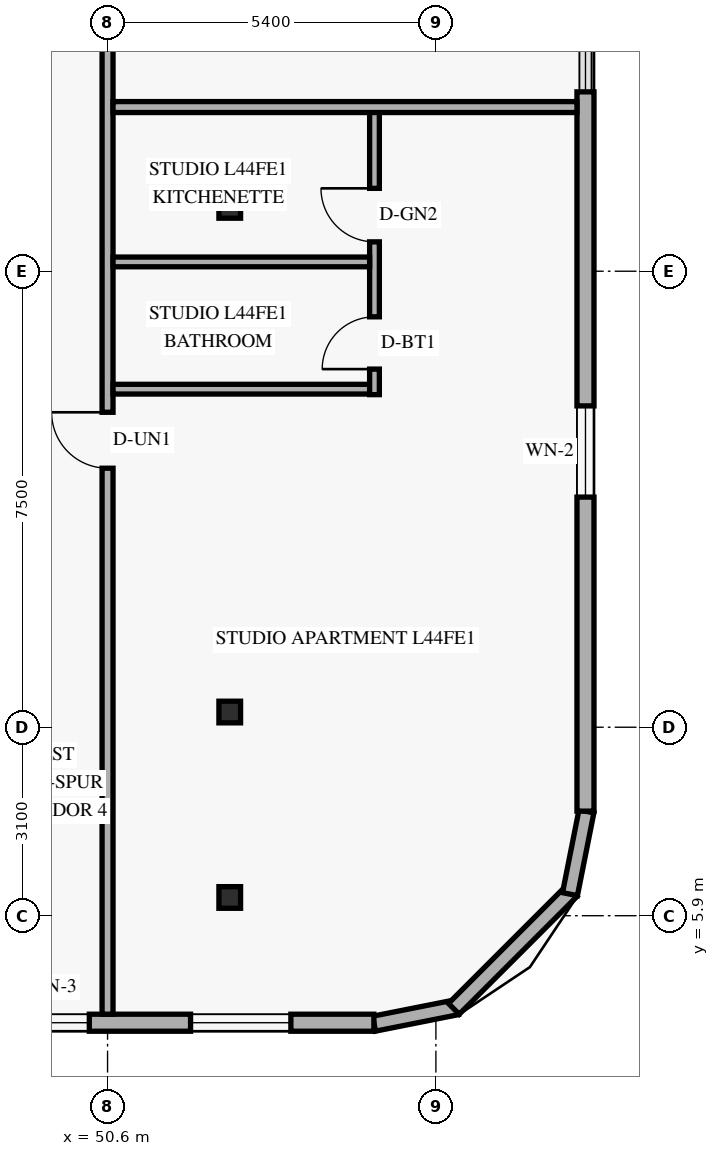
"""IFC4 building model, lengths in metres.
Left out: names, types, materials, properties, quantities, classifications, styles, units other than length and angle.
Written with IfcOpenShell. Run it as: python <this file> out.ifc"""

import sys

from ifc_helpers import new_model, si_unit, direction, frame, frame_2d, origin, origin_2d, place, context, subcontext, project, spatial, rectangle, hollow_rectangle, extrude, element, fill, save


model = new_model("IFC4")
c1 = context("Model", 3, precision=1e-05, world=origin(), true_north=direction((0.0, 1.0)))
c2 = subcontext(c1, "Body", "Model", "MODEL_VIEW")
j1 = project(units=[si_unit("LENGTHUNIT", "METRE"), si_unit("PLANEANGLEUNIT", "RADIAN")], contexts=[c1])
p1 = place(None, origin())
s1 = spatial("IfcSite", under=j1, at=p1, CompositionType="ELEMENT")
p2 = place(p1, origin())
s2 = spatial("IfcBuilding", under=s1, at=p2, CompositionType="ELEMENT")
p3 = place(p2, frame((0.0, 0.0, 169.8)))
s3 = spatial("IfcBuildingStorey", under=s2, at=p3, CompositionType="ELEMENT", Elevation=169.8)
for number, where, z_axis, x_axis in (
    (1, (52.505, 6.2, 0.0), (0.058, 0.0, 0.998), (0.0, 1.0, 0.0)),
    (2, (52.505, 9.25, 0.0), (0.058, 0.0, 0.998), (0.0, 1.0, 0.0)),
    (3, (52.505, 17.55, 0.0), (0.058, 0.0, 0.998), (0.0, 1.0, 0.0)),
):
    element("IfcColumn", number, at=place(p3, frame(where, z_axis=z_axis, x_axis=x_axis)), inside=s3, PredefinedType="COLUMN", context=c2, shape_type="SweptSolid", body=[
        extrude(hollow_rectangle(XDim=0.356, YDim=0.356, WallThickness=0.016, at=origin_2d()), origin(), (0.0, 0.0, 1.0), 3.606),
    ])
p4 = place(p3, frame((54.983, 4.124, 0.0), z_axis=(0.0, 0.0, 1.0), x_axis=(0.980809899341, 0.19496651342, 0.0)))
e4 = element("IfcWall", 4, at=p4, inside=s3, PredefinedType="SOLIDWALL", context=c2, shape_type="SweptSolid", body=[
    extrude(rectangle(XDim=1.389, YDim=0.25, at=frame_2d((0.694, 0.0))), origin(), (0.0, 0.0, 1.0), 3.35),
])
p5 = place(p3, frame((56.295, 4.368, 0.0), z_axis=(0.0, 0.0, 1.0), x_axis=(0.707106781187, 0.707106781187, 0.0)))
e5 = element("IfcWall", 5, at=p5, inside=s3, PredefinedType="SOLIDWALL", context=c2, shape_type="SweptSolid", body=[
    extrude(rectangle(XDim=2.739, YDim=0.25, at=frame_2d((1.37, 0.0))), origin(), (0.0, 0.0, 1.0), 3.35),
])
p6 = place(p3, frame((58.205, 6.254, 0.0), z_axis=(0.0, 0.0, 1.0), x_axis=(0.19496651342, 0.980809899341, 0.0)))
e6 = element("IfcWall", 6, at=p6, inside=s3, PredefinedType="SOLIDWALL", context=c2, shape_type="SweptSolid", body=[
    extrude(rectangle(XDim=1.389, YDim=0.25, at=frame_2d((0.694, 0.0))), origin(), (0.0, 0.0, 1.0), 3.35),
])
p7 = place(p3, frame((21.22, 4.14, 0.0), z_axis=(0.0, 0.0, 1.0), x_axis=(1.0, 0.0, 0.0)))
e7 = element("IfcWall", 7, at=p7, inside=s3, PredefinedType="SOLIDWALL", context=c2, shape_type="SweptSolid", body=[
    extrude(rectangle(XDim=33.76, YDim=0.28, at=frame_2d((16.88, 0.0))), origin(), (0.0, 0.0, 1.0), 3.35),
])
p8 = place(p7, frame((2.68, 0.0, 0.85)))
e8 = element("IfcOpeningElement", 8, at=p8, cuts=e7, PredefinedType="OPENING", context=c2, shape_type="SweptSolid", body=[
    extrude(rectangle(XDim=1.65, YDim=1.6, at=frame_2d((0.825, 0.8))), frame((0.0, 0.15, 0.0), z_axis=(0.0, -1.0, 0.0), x_axis=(1.0, 0.0, 0.0)), (0.0, 0.0, 1.0), 0.3),
])
p9 = place(p7, frame((9.565, 0.0, 0.85)))
e9 = element("IfcOpeningElement", 9, at=p9, cuts=e7, PredefinedType="OPENING", context=c2, shape_type="SweptSolid", body=[
    extrude(rectangle(XDim=1.65, YDim=1.6, at=frame_2d((0.825, 0.8))), frame((0.0, 0.15, 0.0), z_axis=(0.0, -1.0, 0.0), x_axis=(1.0, 0.0, 0.0)), (0.0, 0.0, 1.0), 0.3),
])
p10 = place(p7, frame((14.84, 0.0, 0.85)))
e10 = element("IfcOpeningElement", 10, at=p10, cuts=e7, PredefinedType="OPENING", context=c2, shape_type="SweptSolid", body=[
    extrude(rectangle(XDim=1.65, YDim=1.6, at=frame_2d((0.825, 0.8))), frame((0.0, 0.15, 0.0), z_axis=(0.0, -1.0, 0.0), x_axis=(1.0, 0.0, 0.0)), (0.0, 0.0, 1.0), 0.3),
])
p11 = place(p7, frame((19.035, 0.0, 0.85)))
e11 = element("IfcOpeningElement", 11, at=p11, cuts=e7, PredefinedType="OPENING", context=c2, shape_type="SweptSolid", body=[
    extrude(rectangle(XDim=1.65, YDim=1.6, at=frame_2d((0.825, 0.8))), frame((0.0, 0.15, 0.0), z_axis=(0.0, -1.0, 0.0), x_axis=(1.0, 0.0, 0.0)), (0.0, 0.0, 1.0), 0.3),
])
p12 = place(p7, frame((24.26, 0.0, 0.85)))
e12 = element("IfcOpeningElement", 12, at=p12, cuts=e7, PredefinedType="OPENING", context=c2, shape_type="SweptSolid", body=[
    extrude(rectangle(XDim=1.65, YDim=1.6, at=frame_2d((0.825, 0.8))), frame((0.0, 0.15, 0.0), z_axis=(0.0, -1.0, 0.0), x_axis=(1.0, 0.0, 0.0)), (0.0, 0.0, 1.0), 0.3),
])
p13 = place(p7, frame((27.88, 0.0, 0.85)))
e13 = element("IfcOpeningElement", 13, at=p13, cuts=e7, PredefinedType="OPENING", context=c2, shape_type="SweptSolid", body=[
    extrude(rectangle(XDim=1.2, YDim=1.5, at=frame_2d((0.6, 0.75))), frame((0.0, 0.15, 0.0), z_axis=(0.0, -1.0, 0.0), x_axis=(1.0, 0.0, 0.0)), (0.0, 0.0, 1.0), 0.3),
])
p14 = place(p7, frame((30.745, 0.0, 0.85)))
e14 = element("IfcOpeningElement", 14, at=p14, cuts=e7, PredefinedType="OPENING", context=c2, shape_type="SweptSolid", body=[
    extrude(rectangle(XDim=1.65, YDim=1.6, at=frame_2d((0.825, 0.8))), frame((0.0, 0.15, 0.0), z_axis=(0.0, -1.0, 0.0), x_axis=(1.0, 0.0, 0.0)), (0.0, 0.0, 1.0), 0.3),
])
p15 = place(p3, frame((58.46, 7.62, 0.0), z_axis=(0.0, 0.0, 1.0), x_axis=(0.0, 1.0, 0.0)))
e15 = element("IfcWall", 15, at=p15, inside=s3, PredefinedType="SOLIDWALL", context=c2, shape_type="SweptSolid", body=[
    extrude(rectangle(XDim=11.83, YDim=0.28, at=frame_2d((5.915, 0.0))), origin(), (0.0, 0.0, 1.0), 3.35),
])
p16 = place(p15, frame((5.165, 0.0, 0.85)))
e16 = element("IfcOpeningElement", 16, at=p16, cuts=e15, PredefinedType="OPENING", context=c2, shape_type="SweptSolid", body=[
    extrude(rectangle(XDim=1.5, YDim=1.55, at=frame_2d((0.75, 0.775))), frame((0.0, 0.15, 0.0), z_axis=(0.0, -1.0, 0.0), x_axis=(1.0, 0.0, 0.0)), (0.0, 0.0, 1.0), 0.3),
])
p17 = place(p3, frame((50.6, 4.28, 0.0), z_axis=(0.0, 0.0, 1.0), x_axis=(0.0, 1.0, 0.0)))
e17 = element("IfcWall", 17, at=p17, inside=s3, PredefinedType="STANDARD", context=c2, shape_type="SweptSolid", body=[
    extrude(rectangle(XDim=39.44, YDim=0.18, at=frame_2d((19.72, 0.0))), origin(), (0.0, 0.0, 1.0), 2.72),
])
p18 = place(p17, frame((8.98, 0.0, 0.0)))
e18 = element("IfcOpeningElement", 18, at=p18, cuts=e17, PredefinedType="OPENING", context=c2, shape_type="SweptSolid", body=[
    extrude(rectangle(XDim=0.92, YDim=2.15, at=frame_2d((0.46, 1.075))), frame((0.0, 0.1, 0.0), z_axis=(0.0, -1.0, 0.0), x_axis=(1.0, 0.0, 0.0)), (0.0, 0.0, 1.0), 0.2),
])
p19 = place(p17, frame((19.616, 0.0, 0.0)))
e19 = element("IfcOpeningElement", 19, at=p19, cuts=e17, PredefinedType="OPENING", context=c2, shape_type="SweptSolid", body=[
    extrude(rectangle(XDim=0.92, YDim=2.15, at=frame_2d((0.46, 1.075))), frame((0.0, 0.1, 0.0), z_axis=(0.0, -1.0, 0.0), x_axis=(1.0, 0.0, 0.0)), (0.0, 0.0, 1.0), 0.2),
])
p20 = place(p17, frame((30.207, 0.0, 0.0)))
e20 = element("IfcOpeningElement", 20, at=p20, cuts=e17, PredefinedType="OPENING", context=c2, shape_type="SweptSolid", body=[
    extrude(rectangle(XDim=0.92, YDim=2.15, at=frame_2d((0.46, 1.075))), frame((0.0, 0.1, 0.0), z_axis=(0.0, -1.0, 0.0), x_axis=(1.0, 0.0, 0.0)), (0.0, 0.0, 1.0), 0.2),
])
p21 = place(p3, frame((50.69, 14.56, 0.0), z_axis=(0.0, 0.0, 1.0), x_axis=(1.0, 0.0, 0.0)))
e21 = element("IfcWall", 21, at=p21, inside=s3, PredefinedType="PLUMBINGWALL", context=c2, shape_type="SweptSolid", body=[
    extrude(rectangle(XDim=4.38, YDim=0.16, at=frame_2d((2.19, 0.0))), origin(), (0.0, 0.0, 1.0), 2.869),
])
p22 = place(p3, frame((54.99, 14.47, 0.0), z_axis=(0.0, 0.0, 1.0), x_axis=(0.0, 1.0, 0.0)))
e22 = element("IfcWall", 22, at=p22, inside=s3, PredefinedType="PLUMBINGWALL", context=c2, shape_type="SweptSolid", body=[
    extrude(rectangle(XDim=4.73, YDim=0.16, at=frame_2d((2.365, 0.0))), origin(), (0.0, 0.0, 1.0), 3.35),
])
p23 = place(p22, frame((0.42, 0.0, 0.0)))
e23 = element("IfcOpeningElement", 23, at=p23, cuts=e22, PredefinedType="OPENING", context=c2, shape_type="SweptSolid", body=[
    extrude(rectangle(XDim=0.86, YDim=2.12, at=frame_2d((0.43, 1.06))), frame((0.0, 0.09, 0.0), z_axis=(0.0, -1.0, 0.0), x_axis=(1.0, 0.0, 0.0)), (0.0, 0.0, 1.0), 0.18),
])
p24 = place(p22, frame((2.513, 0.0, 0.0)))
e24 = element("IfcOpeningElement", 24, at=p24, cuts=e22, PredefinedType="OPENING", context=c2, shape_type="SweptSolid", body=[
    extrude(rectangle(XDim=0.88, YDim=2.12, at=frame_2d((0.44, 1.06))), frame((0.0, 0.09, 0.0), z_axis=(0.0, -1.0, 0.0), x_axis=(1.0, 0.0, 0.0)), (0.0, 0.0, 1.0), 0.18),
])
p25 = place(p3, frame((50.69, 16.653, 0.0), z_axis=(0.0, 0.0, 1.0), x_axis=(1.0, 0.0, 0.0)))
e25 = element("IfcWall", 25, at=p25, inside=s3, PredefinedType="PLUMBINGWALL", context=c2, shape_type="SweptSolid", body=[
    extrude(rectangle(XDim=4.22, YDim=0.16, at=frame_2d((2.11, 0.0))), origin(), (0.0, 0.0, 1.0), 2.869),
])
p26 = place(p3, frame((50.69, 19.2, 0.0), z_axis=(0.0, 0.0, 1.0), x_axis=(1.0, 0.0, 0.0)))
e26 = element("IfcWall", 26, at=p26, inside=s3, PredefinedType="PARTITIONING", context=c2, shape_type="SweptSolid", body=[
    extrude(rectangle(XDim=7.63, YDim=0.18, at=frame_2d((3.815, 0.0))), origin(), (0.0, 0.0, 1.0), 2.869),
])
p27 = place(p13, origin())
e27 = element("IfcWindow", 27, at=p27, inside=s3, PartitioningType="SINGLE_PANEL", PredefinedType="WINDOW", context=c2, shape_type="SweptSolid", body=[
    extrude(rectangle(XDim=1.2, YDim=1.5, at=frame_2d((0.6, 0.75))), frame((0.0, 0.03, 0.0), z_axis=(0.0, -1.0, 0.0), x_axis=(1.0, 0.0, 0.0)), (0.0, 0.0, 1.0), 0.06),
])
fill(e13, e27)
p28 = place(p14, origin())
e28 = element("IfcWindow", 28, at=p28, inside=s3, PartitioningType="SINGLE_PANEL", PredefinedType="WINDOW", context=c2, shape_type="SweptSolid", body=[
    extrude(rectangle(XDim=1.65, YDim=1.6, at=frame_2d((0.825, 0.8))), frame((0.0, 0.03, 0.0), z_axis=(0.0, -1.0, 0.0), x_axis=(1.0, 0.0, 0.0)), (0.0, 0.0, 1.0), 0.06),
])
fill(e14, e28)
p29 = place(p16, origin())
e29 = element("IfcWindow", 29, at=p29, inside=s3, PartitioningType="SINGLE_PANEL", PredefinedType="WINDOW", context=c2, shape_type="SweptSolid", body=[
    extrude(rectangle(XDim=1.5, YDim=1.55, at=frame_2d((0.75, 0.775))), frame((0.0, 0.03, 0.0), z_axis=(0.0, -1.0, 0.0), x_axis=(1.0, 0.0, 0.0)), (0.0, 0.0, 1.0), 0.06),
])
fill(e16, e29)
p30 = place(p18, origin())
e30 = element("IfcDoor", 30, at=p30, inside=s3, OperationType="SINGLE_SWING_RIGHT", PredefinedType="DOOR", context=c2, shape_type="SweptSolid", body=[
    extrude(rectangle(XDim=0.92, YDim=2.15, at=frame_2d((0.46, 1.075))), frame((0.0, 0.025, 0.0), z_axis=(0.0, -1.0, 0.0), x_axis=(1.0, 0.0, 0.0)), (0.0, 0.0, 1.0), 0.05),
])
fill(e18, e30)
p31 = place(p23, origin())
e31 = element("IfcDoor", 31, at=p31, inside=s3, OperationType="SINGLE_SWING_LEFT", PredefinedType="DOOR", context=c2, shape_type="SweptSolid", body=[
    extrude(rectangle(XDim=0.86, YDim=2.12, at=frame_2d((0.43, 1.06))), frame((0.0, 0.025, 0.0), z_axis=(0.0, -1.0, 0.0), x_axis=(1.0, 0.0, 0.0)), (0.0, 0.0, 1.0), 0.05),
])
fill(e23, e31)
p32 = place(p24, origin())
e32 = element("IfcDoor", 32, at=p32, inside=s3, OperationType="SINGLE_SWING_RIGHT", PredefinedType="DOOR", context=c2, shape_type="SweptSolid", body=[
    extrude(rectangle(XDim=0.88, YDim=2.12, at=frame_2d((0.44, 1.06))), frame((0.0, 0.025, 0.0), z_axis=(0.0, -1.0, 0.0), x_axis=(1.0, 0.0, 0.0)), (0.0, 0.0, 1.0), 0.05),
])
fill(e24, e32)
save(model, sys.argv[1])
